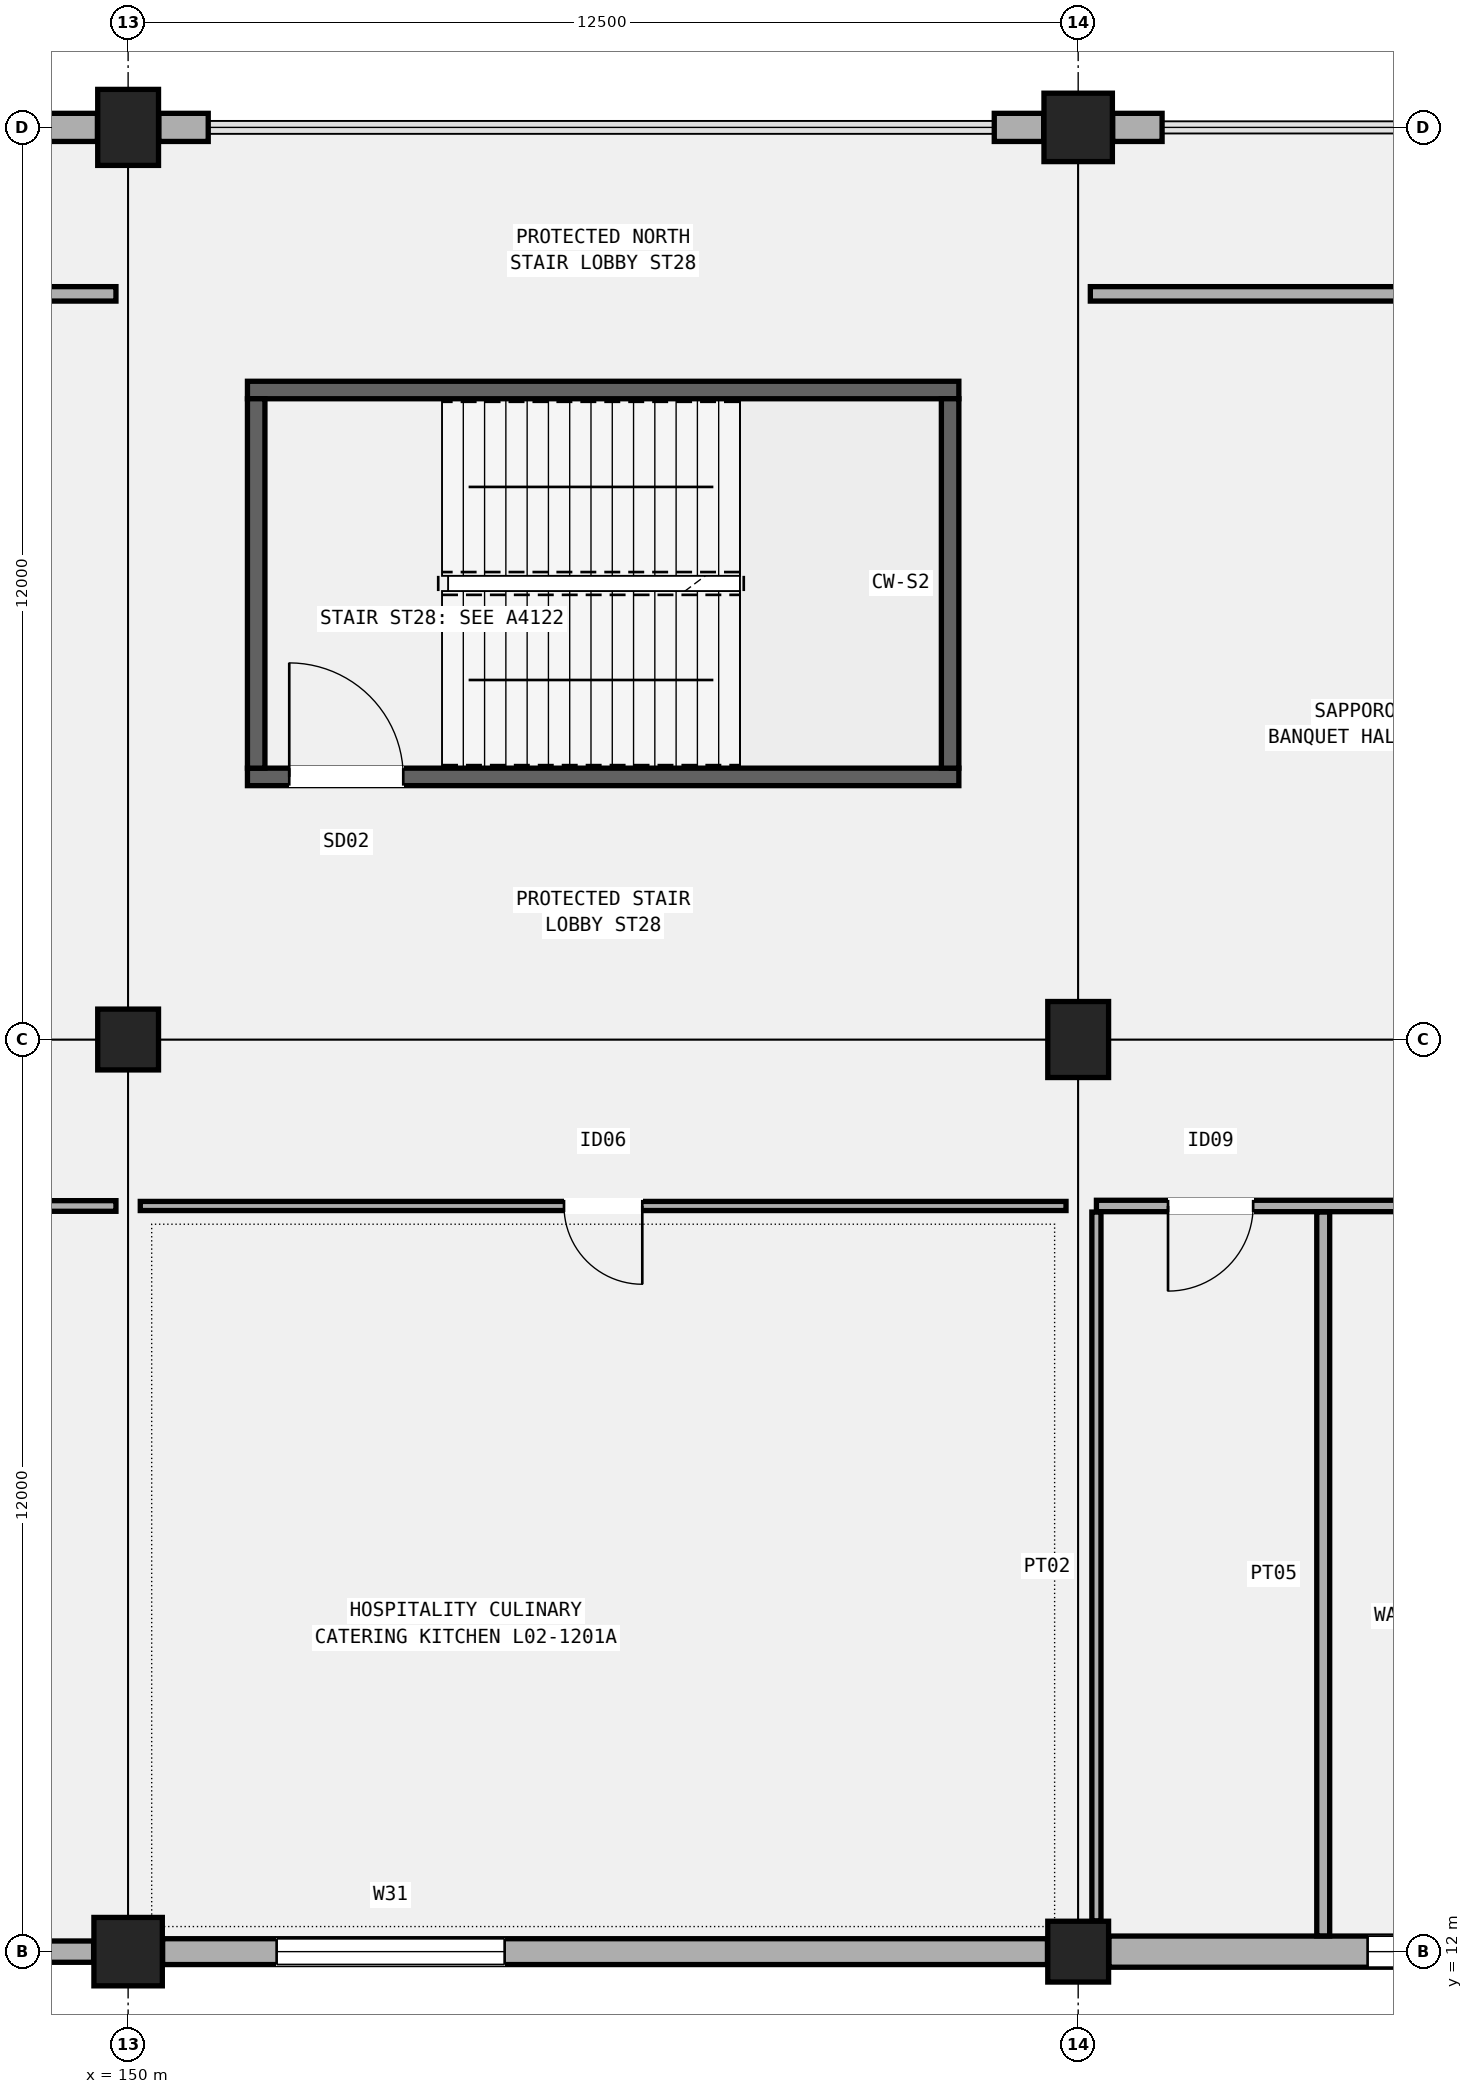
"""IFC4 building model, lengths in metres.
Left out: names, types, materials, properties, quantities, classifications, styles, units other than length and angle.
Written with IfcOpenShell. Run it as: python <this file> out.ifc"""

import sys

from ifc_helpers import new_model, si_unit, direction, frame, frame_2d, origin, origin_2d, place, context, subcontext, project, spatial, rectangle, extrude, element, fill, save


model = new_model("IFC4")
c1 = context("Model", 3, precision=1e-05, world=origin(), true_north=direction((0.0, 1.0)))
c2 = subcontext(c1, "Body", "Model", "MODEL_VIEW")
j1 = project(units=[si_unit("LENGTHUNIT", "METRE"), si_unit("PLANEANGLEUNIT", "RADIAN")], contexts=[c1])
p1 = place(None, origin())
s1 = spatial("IfcSite", under=j1, at=p1, CompositionType="ELEMENT")
p2 = place(p1, origin())
s2 = spatial("IfcBuilding", under=s1, at=p2, CompositionType="ELEMENT")
p3 = place(p2, frame((0.0, 0.0, 10.2)))
s3 = spatial("IfcBuildingStorey", under=s2, at=p3, CompositionType="ELEMENT", Elevation=10.2)
p4 = place(p3, frame((150.0, 12.0, 0.0), z_axis=(0.0, 0.0, 1.0), x_axis=(1.0, 0.0, 0.0)))
e1 = element("IfcColumn", 1, at=p4, inside=s3, PredefinedType="COLUMN", context=c2, shape_type="SweptSolid", body=[
    extrude(rectangle(XDim=0.9, YDim=0.9, at=origin_2d()), origin(), (0.0, 0.0, 1.0), 5.1),
])
p5 = place(p3, frame((150.0, 24.0, 0.0), z_axis=(0.0, 0.0, 1.0), x_axis=(1.0, 0.0, 0.0)))
e2 = element("IfcColumn", 2, at=p5, inside=s3, PredefinedType="COLUMN", context=c2, shape_type="SweptSolid", body=[
    extrude(rectangle(XDim=0.8, YDim=0.8, at=origin_2d()), origin(), (0.0, 0.0, 1.0), 5.1),
])
p6 = place(p3, frame((150.0, 36.0, 0.0), z_axis=(0.0, 0.0, 1.0), x_axis=(1.0, 0.0, 0.0)))
e3 = element("IfcColumn", 3, at=p6, inside=s3, PredefinedType="COLUMN", context=c2, shape_type="SweptSolid", body=[
    extrude(rectangle(XDim=0.8, YDim=1.0, at=origin_2d()), origin(), (0.0, 0.0, 1.0), 5.1),
])
p7 = place(p3, frame((162.5, 12.0, 0.0), z_axis=(0.0, 0.0, 1.0), x_axis=(1.0, 0.0, 0.0)))
e4 = element("IfcColumn", 4, at=p7, inside=s3, PredefinedType="COLUMN", context=c2, shape_type="SweptSolid", body=[
    extrude(rectangle(XDim=0.8, YDim=0.8, at=origin_2d()), origin(), (0.0, 0.0, 1.0), 5.1),
])
p8 = place(p3, frame((162.5, 24.0, 0.0), z_axis=(0.0, 0.0, 1.0), x_axis=(1.0, 0.0, 0.0)))
e5 = element("IfcColumn", 5, at=p8, inside=s3, PredefinedType="COLUMN", context=c2, shape_type="SweptSolid", body=[
    extrude(rectangle(XDim=0.8, YDim=1.0, at=origin_2d()), origin(), (0.0, 0.0, 1.0), 5.1),
])
p9 = place(p3, frame((162.5, 36.0, 0.0), z_axis=(0.0, 0.0, 1.0), x_axis=(1.0, 0.0, 0.0)))
e6 = element("IfcColumn", 6, at=p9, inside=s3, PredefinedType="COLUMN", context=c2, shape_type="SweptSolid", body=[
    extrude(rectangle(XDim=0.9, YDim=0.9, at=origin_2d()), origin(), (0.0, 0.0, 1.0), 5.1),
])
p10 = place(p3, frame((137.904, 12.0, 0.0), z_axis=(0.0, 0.0, 1.0), x_axis=(1.0, 0.0, 0.0)))
e7 = element("IfcWall", 7, at=p10, inside=s3, PredefinedType="SOLIDWALL", context=c2, shape_type="SweptSolid", body=[
    extrude(rectangle(XDim=11.642, YDim=0.28, at=frame_2d((5.821, 0.0))), origin(), (0.0, 0.0, 1.0), 4.02),
])
p11 = place(p10, frame((1.5, 0.0, 0.95)))
e8 = element("IfcOpeningElement", 8, at=p11, cuts=e7, PredefinedType="OPENING", context=c2, shape_type="SweptSolid", body=[
    extrude(rectangle(XDim=2.85, YDim=2.0, at=frame_2d((1.425, 1.0))), frame((0.0, 0.15, 0.0), z_axis=(0.0, -1.0, 0.0), x_axis=(1.0, 0.0, 0.0)), (0.0, 0.0, 1.0), 0.3),
])
p12 = place(p3, frame((148.946, 36.0, 0.0), z_axis=(0.0, 0.0, 1.0), x_axis=(1.0, 0.0, 0.0)))
e9 = element("IfcWall", 9, at=p12, inside=s3, PredefinedType="SOLIDWALL", context=c2, shape_type="SweptSolid", body=[
    extrude(rectangle(XDim=0.65, YDim=0.37, at=frame_2d((0.325, 0.0))), origin(), (0.0, 0.0, 1.0), 4.22),
])
p13 = place(p3, frame((150.454, 12.0, 0.0), z_axis=(0.0, 0.0, 1.0), x_axis=(1.0, 0.0, 0.0)))
e10 = element("IfcWall", 10, at=p13, inside=s3, PredefinedType="SOLIDWALL", context=c2, shape_type="SweptSolid", body=[
    extrude(rectangle(XDim=11.642, YDim=0.34, at=frame_2d((5.821, 0.0))), origin(), (0.0, 0.0, 1.0), 4.12),
])
p14 = place(p13, frame((1.5, 0.0, 0.95)))
e11 = element("IfcOpeningElement", 11, at=p14, cuts=e10, PredefinedType="OPENING", context=c2, shape_type="SweptSolid", body=[
    extrude(rectangle(XDim=3.0, YDim=2.15, at=frame_2d((1.5, 1.075))), frame((0.0, 0.18, 0.0), z_axis=(0.0, -1.0, 0.0), x_axis=(1.0, 0.0, 0.0)), (0.0, 0.0, 1.0), 0.36),
])
for number, where, z_axis, x_axis in (
    (12, (150.404, 36.0, 0.0), (0.0, 0.0, 1.0), (1.0, 0.0, 0.0)),
    (13, (161.396, 36.0, 0.0), (0.0, 0.0, 1.0), (1.0, 0.0, 0.0)),
):
    element("IfcWall", number, at=place(p3, frame(where, z_axis=z_axis, x_axis=x_axis)), inside=s3, PredefinedType="SOLIDWALL", context=c2, shape_type="SweptSolid", body=[
        extrude(rectangle(XDim=0.65, YDim=0.37, at=frame_2d((0.325, 0.0))), origin(), (0.0, 0.0, 1.0), 4.02),
    ])
p15 = place(p3, frame((162.904, 12.0, 0.0), z_axis=(0.0, 0.0, 1.0), x_axis=(1.0, 0.0, 0.0)))
e14 = element("IfcWall", 14, at=p15, inside=s3, PredefinedType="SOLIDWALL", context=c2, shape_type="SweptSolid", body=[
    extrude(rectangle(XDim=11.692, YDim=0.41, at=frame_2d((5.846, 0.0))), origin(), (0.0, 0.0, 1.0), 4.22),
])
p16 = place(p15, frame((3.404, 0.0, 0.95)))
e15 = element("IfcOpeningElement", 15, at=p16, cuts=e14, PredefinedType="OPENING", context=c2, shape_type="SweptSolid", body=[
    extrude(rectangle(XDim=3.3, YDim=1.8, at=frame_2d((1.65, 0.9))), frame((0.0, 0.215, 0.0), z_axis=(0.0, -1.0, 0.0), x_axis=(1.0, 0.0, 0.0)), (0.0, 0.0, 1.0), 0.43),
])
p17 = place(p3, frame((162.954, 36.0, 0.0), z_axis=(0.0, 0.0, 1.0), x_axis=(1.0, 0.0, 0.0)))
e16 = element("IfcWall", 16, at=p17, inside=s3, PredefinedType="SOLIDWALL", context=c2, shape_type="SweptSolid", body=[
    extrude(rectangle(XDim=0.65, YDim=0.37, at=frame_2d((0.325, 0.0))), origin(), (0.0, 0.0, 1.0), 4.12),
])
p18 = place(p3, frame((151.57, 27.455, 0.0), z_axis=(0.0, 0.0, 1.0), x_axis=(1.0, 0.0, 0.0)))
e17 = element("IfcWall", 17, at=p18, inside=s3, PredefinedType="SHEAR", context=c2, shape_type="SweptSolid", body=[
    extrude(rectangle(XDim=9.36, YDim=0.23, at=frame_2d((4.68, 0.0))), origin(), (0.0, 0.0, 1.0), 4.82),
])
p19 = place(p18, frame((0.55, 0.0, 0.0)))
e18 = element("IfcOpeningElement", 18, at=p19, cuts=e17, PredefinedType="OPENING", context=c2, shape_type="SweptSolid", body=[
    extrude(rectangle(XDim=1.5, YDim=2.2, at=frame_2d((0.75, 1.1))), frame((0.0, 0.125, 0.0), z_axis=(0.0, -1.0, 0.0), x_axis=(1.0, 0.0, 0.0)), (0.0, 0.0, 1.0), 0.25),
])
p20 = place(p3, frame((151.57, 32.545, 0.0), z_axis=(0.0, 0.0, 1.0), x_axis=(1.0, 0.0, 0.0)))
e19 = element("IfcWall", 19, at=p20, inside=s3, PredefinedType="SHEAR", context=c2, shape_type="SweptSolid", body=[
    extrude(rectangle(XDim=9.36, YDim=0.23, at=frame_2d((4.68, 0.0))), origin(), (0.0, 0.0, 1.0), 4.82),
])
for number, where, z_axis, x_axis in (
    (20, (151.685, 27.57, 0.0), (0.0, 0.0, 1.0), (0.0, 1.0, 0.0)),
    (21, (160.815, 27.57, 0.0), (0.0, 0.0, 1.0), (0.0, 1.0, 0.0)),
):
    element("IfcWall", number, at=place(p3, frame(where, z_axis=z_axis, x_axis=x_axis)), inside=s3, PredefinedType="SHEAR", context=c2, shape_type="SweptSolid", body=[
        extrude(rectangle(XDim=4.86, YDim=0.23, at=frame_2d((2.43, 0.0))), origin(), (0.0, 0.0, 1.0), 4.82),
    ])
p21 = place(p3, frame((139.62, 21.81, 0.0), z_axis=(0.0, 0.0, 1.0), x_axis=(1.0, 0.0, 0.0)))
e22 = element("IfcWall", 22, at=p21, inside=s3, PredefinedType="PARTITIONING", context=c2, shape_type="SweptSolid", body=[
    extrude(rectangle(XDim=10.22, YDim=0.14, at=frame_2d((5.11, 0.0))), origin(), (0.0, 0.0, 1.0), 4.22),
])
p22 = place(p21, frame((5.57, 0.0, 0.0), z_axis=(0.0, 0.0, 1.0), x_axis=(-1.0, 0.0, 0.0)))
e23 = element("IfcOpeningElement", 23, at=p22, cuts=e22, PredefinedType="OPENING", context=c2, shape_type="SweptSolid", body=[
    extrude(rectangle(XDim=0.92, YDim=2.1, at=frame_2d((0.46, 1.05))), frame((0.0, 0.08, 0.0), z_axis=(0.0, -1.0, 0.0), x_axis=(1.0, 0.0, 0.0)), (0.0, 0.0, 1.0), 0.16),
])
p23 = place(p3, frame((139.62, 33.81, 0.0), z_axis=(0.0, 0.0, 1.0), x_axis=(1.0, 0.0, 0.0)))
e24 = element("IfcWall", 24, at=p23, inside=s3, PredefinedType="PARTITIONING", context=c2, shape_type="SweptSolid", body=[
    extrude(rectangle(XDim=10.22, YDim=0.19, at=frame_2d((5.11, 0.0))), origin(), (0.0, 0.0, 1.0), 4.22),
])
p24 = place(p23, frame((5.585, 0.0, 0.0), z_axis=(0.0, 0.0, 1.0), x_axis=(-1.0, 0.0, 0.0)))
e25 = element("IfcOpeningElement", 25, at=p24, cuts=e24, PredefinedType="OPENING", context=c2, shape_type="SweptSolid", body=[
    extrude(rectangle(XDim=0.95, YDim=2.12, at=frame_2d((0.475, 1.06))), frame((0.0, 0.105, 0.0), z_axis=(0.0, -1.0, 0.0), x_axis=(1.0, 0.0, 0.0)), (0.0, 0.0, 1.0), 0.21),
])
p25 = place(p3, frame((150.16, 21.81, 0.0), z_axis=(0.0, 0.0, 1.0), x_axis=(1.0, 0.0, 0.0)))
e26 = element("IfcWall", 26, at=p25, inside=s3, PredefinedType="PARTITIONING", context=c2, shape_type="SweptSolid", body=[
    extrude(rectangle(XDim=12.18, YDim=0.12, at=frame_2d((6.09, 0.0))), origin(), (0.0, 0.0, 1.0), 4.22),
])
p26 = place(p25, frame((6.605, 0.0, 0.0), z_axis=(0.0, 0.0, 1.0), x_axis=(-1.0, 0.0, 0.0)))
e27 = element("IfcOpeningElement", 27, at=p26, cuts=e26, PredefinedType="OPENING", context=c2, shape_type="SweptSolid", body=[
    extrude(rectangle(XDim=1.03, YDim=2.12, at=frame_2d((0.515, 1.06))), frame((0.0, 0.07, 0.0), z_axis=(0.0, -1.0, 0.0), x_axis=(1.0, 0.0, 0.0)), (0.0, 0.0, 1.0), 0.14),
])
p27 = place(p3, frame((162.74, 21.81, 0.0), z_axis=(0.0, 0.0, 1.0), x_axis=(1.0, 0.0, 0.0)))
e28 = element("IfcWall", 28, at=p27, inside=s3, PredefinedType="PARTITIONING", context=c2, shape_type="SweptSolid", body=[
    extrude(rectangle(XDim=12.02, YDim=0.15, at=frame_2d((6.01, 0.0))), origin(), (0.0, 0.0, 1.0), 4.22),
])
p28 = place(p27, frame((2.062, 0.0, 0.0), z_axis=(0.0, 0.0, 1.0), x_axis=(-1.0, 0.0, 0.0)))
e29 = element("IfcOpeningElement", 29, at=p28, cuts=e28, PredefinedType="OPENING", context=c2, shape_type="SweptSolid", body=[
    extrude(rectangle(XDim=1.12, YDim=2.18, at=frame_2d((0.56, 1.09))), frame((0.0, 0.085, 0.0), z_axis=(0.0, -1.0, 0.0), x_axis=(1.0, 0.0, 0.0)), (0.0, 0.0, 1.0), 0.17),
])
p29 = place(p27, frame((5.833, 0.0, 0.0), z_axis=(0.0, 0.0, 1.0), x_axis=(-1.0, 0.0, 0.0)))
e30 = element("IfcOpeningElement", 30, at=p29, cuts=e28, PredefinedType="OPENING", context=c2, shape_type="SweptSolid", body=[
    extrude(rectangle(XDim=1.15, YDim=2.15, at=frame_2d((0.575, 1.075))), frame((0.0, 0.085, 0.0), z_axis=(0.0, -1.0, 0.0), x_axis=(1.0, 0.0, 0.0)), (0.0, 0.0, 1.0), 0.17),
])
p30 = place(p27, frame((10.356, 0.0, 0.0), z_axis=(0.0, 0.0, 1.0), x_axis=(-1.0, 0.0, 0.0)))
e31 = element("IfcOpeningElement", 31, at=p30, cuts=e28, PredefinedType="OPENING", context=c2, shape_type="SweptSolid", body=[
    extrude(rectangle(XDim=1.18, YDim=2.2, at=frame_2d((0.59, 1.1))), frame((0.0, 0.085, 0.0), z_axis=(0.0, -1.0, 0.0), x_axis=(1.0, 0.0, 0.0)), (0.0, 0.0, 1.0), 0.17),
])
p31 = place(p3, frame((162.74, 12.404, 0.0), z_axis=(0.0, 0.0, 1.0), x_axis=(0.0, 1.0, 0.0)))
e32 = element("IfcWall", 32, at=p31, inside=s3, PredefinedType="PARTITIONING", context=c2, shape_type="SweptSolid", body=[
    extrude(rectangle(XDim=9.326, YDim=0.12, at=frame_2d((4.663, 0.0))), origin(), (0.0, 0.0, 1.0), 4.192),
])
p32 = place(p3, frame((165.724, 12.207, 0.0), z_axis=(0.0, 0.0, 1.0), x_axis=(0.0, 1.0, 0.0)))
e33 = element("IfcWall", 33, at=p32, inside=s3, PredefinedType="PARTITIONING", context=c2, shape_type="SweptSolid", body=[
    extrude(rectangle(XDim=9.523, YDim=0.17, at=frame_2d((4.761, 0.0))), origin(), (0.0, 0.0, 1.0), 4.22),
])
p33 = place(p3, frame((162.66, 33.81, 0.0), z_axis=(0.0, 0.0, 1.0), x_axis=(1.0, 0.0, 0.0)))
e34 = element("IfcWall", 34, at=p33, inside=s3, PredefinedType="PARTITIONING", context=c2, shape_type="SweptSolid", body=[
    extrude(rectangle(XDim=12.18, YDim=0.19, at=frame_2d((6.09, 0.0))), origin(), (0.0, 0.0, 1.0), 4.22),
])
p34 = place(p33, frame((6.695, 0.0, 0.0), z_axis=(0.0, 0.0, 1.0), x_axis=(-1.0, 0.0, 0.0)))
e35 = element("IfcOpeningElement", 35, at=p34, cuts=e34, PredefinedType="OPENING", context=c2, shape_type="SweptSolid", body=[
    extrude(rectangle(XDim=1.21, YDim=2.18, at=frame_2d((0.605, 1.09))), frame((0.0, 0.105, 0.0), z_axis=(0.0, -1.0, 0.0), x_axis=(1.0, 0.0, 0.0)), (0.0, 0.0, 1.0), 0.21),
])
p35 = place(p14, origin())
e36 = element("IfcWindow", 36, at=p35, inside=s3, PartitioningType="SINGLE_PANEL", PredefinedType="WINDOW", context=c2, shape_type="SweptSolid", body=[
    extrude(rectangle(XDim=3.0, YDim=2.15, at=frame_2d((1.5, 1.075))), frame((0.0, 0.03, 0.0), z_axis=(0.0, -1.0, 0.0), x_axis=(1.0, 0.0, 0.0)), (0.0, 0.0, 1.0), 0.06),
])
fill(e11, e36)
p36 = place(p16, origin())
e37 = element("IfcWindow", 37, at=p36, inside=s3, PartitioningType="SINGLE_PANEL", PredefinedType="WINDOW", context=c2, shape_type="SweptSolid", body=[
    extrude(rectangle(XDim=3.3, YDim=1.8, at=frame_2d((1.65, 0.9))), frame((0.0, 0.03, 0.0), z_axis=(0.0, -1.0, 0.0), x_axis=(1.0, 0.0, 0.0)), (0.0, 0.0, 1.0), 0.06),
])
fill(e15, e37)
p37 = place(p19, origin())
e38 = element("IfcDoor", 38, at=p37, inside=s3, OperationType="SINGLE_SWING_LEFT", PredefinedType="DOOR", context=c2, shape_type="SweptSolid", body=[
    extrude(rectangle(XDim=1.5, YDim=2.2, at=frame_2d((0.75, 1.1))), frame((0.0, 0.025, 0.0), z_axis=(0.0, -1.0, 0.0), x_axis=(1.0, 0.0, 0.0)), (0.0, 0.0, 1.0), 0.05),
])
fill(e18, e38)
p38 = place(p26, origin())
e39 = element("IfcDoor", 39, at=p38, inside=s3, OperationType="SINGLE_SWING_LEFT", PredefinedType="DOOR", context=c2, shape_type="SweptSolid", body=[
    extrude(rectangle(XDim=1.03, YDim=2.12, at=frame_2d((0.515, 1.06))), frame((0.0, 0.025, 0.0), z_axis=(0.0, -1.0, 0.0), x_axis=(1.0, 0.0, 0.0)), (0.0, 0.0, 1.0), 0.05),
])
fill(e27, e39)
p39 = place(p28, origin())
e40 = element("IfcDoor", 40, at=p39, inside=s3, OperationType="SINGLE_SWING_RIGHT", PredefinedType="DOOR", context=c2, shape_type="SweptSolid", body=[
    extrude(rectangle(XDim=1.12, YDim=2.18, at=frame_2d((0.56, 1.09))), frame((0.0, 0.025, 0.0), z_axis=(0.0, -1.0, 0.0), x_axis=(1.0, 0.0, 0.0)), (0.0, 0.0, 1.0), 0.05),
])
fill(e29, e40)
save(model, sys.argv[1])
